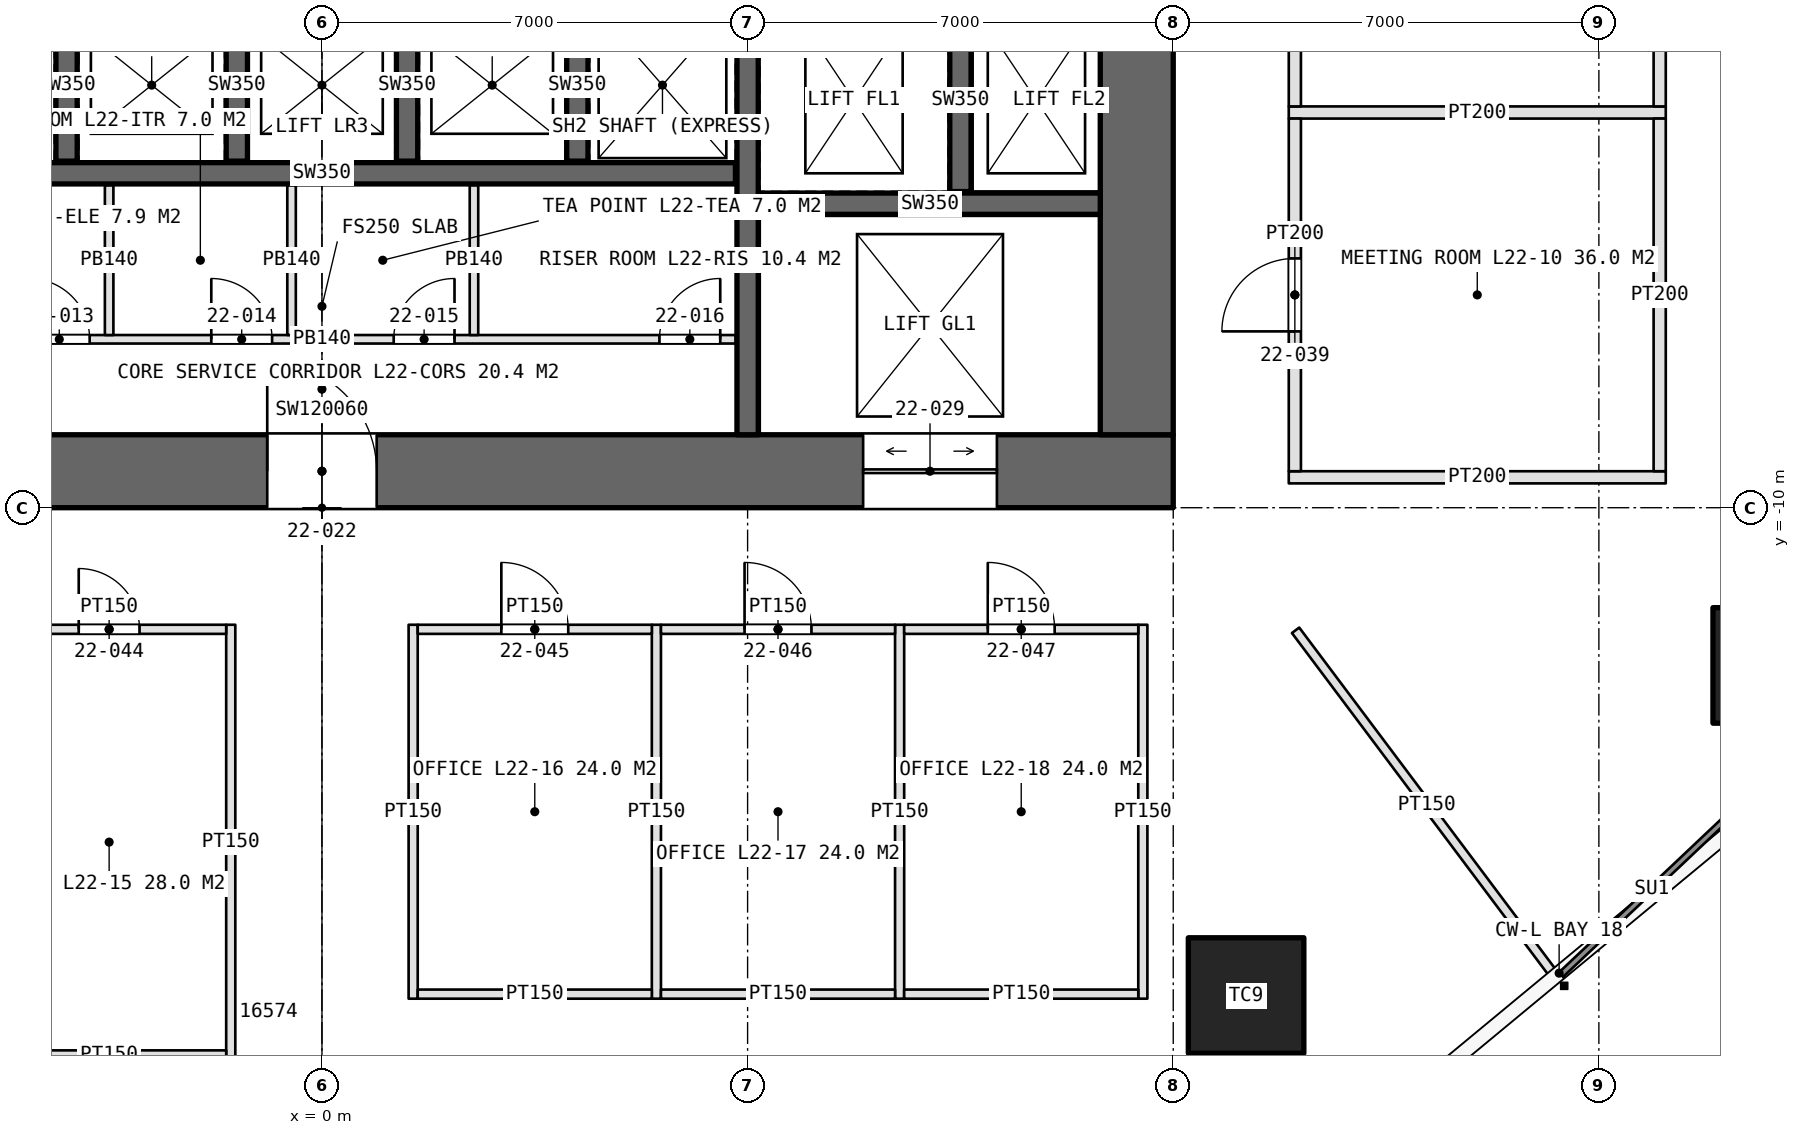
"""IFC4 building model, lengths in metres.
Left out: names, types, materials, properties, quantities, classifications, styles, units other than length and angle.
Written with IfcOpenShell. Run it as: python <this file> out.ifc"""

import sys

from ifc_helpers import new_model, si_unit, direction, frame, frame_2d, origin, origin_2d, place, context, subcontext, project, spatial, rectangle, extrude, element, fill, save


model = new_model("IFC4")
c1 = context("Model", 3, precision=1e-05, world=origin(), true_north=direction((0.0, 1.0)))
c2 = subcontext(c1, "Body", "Model", "MODEL_VIEW")
j1 = project(units=[si_unit("LENGTHUNIT", "METRE"), si_unit("PLANEANGLEUNIT", "RADIAN")], contexts=[c1])
p1 = place(None, origin())
s1 = spatial("IfcSite", under=j1, at=p1, CompositionType="ELEMENT")
p2 = place(p1, origin())
s2 = spatial("IfcBuilding", under=s1, at=p2, CompositionType="ELEMENT")
p3 = place(p2, frame((0.0, 0.0, 109.2)))
s3 = spatial("IfcBuildingStorey", under=s2, at=p3, CompositionType="ELEMENT", Elevation=109.2)
p4 = place(p3, frame((-14.0, -9.4, 0.0), z_axis=(0.0, 0.0, 1.0), x_axis=(1.0, 0.0, 0.0)))
e1 = element("IfcWall", 1, at=p4, inside=s3, PredefinedType="SHEAR", context=c2, shape_type="SweptSolid", body=[
    extrude(rectangle(XDim=28.0, YDim=1.2, at=frame_2d((14.0, 0.0))), origin(), (0.0, 0.0, 1.0), 4.2),
])
p5 = place(p4, frame((13.1, 0.0, 0.0)))
e2 = element("IfcOpeningElement", 2, at=p5, cuts=e1, PredefinedType="OPENING", context=c2, shape_type="SweptSolid", body=[
    extrude(rectangle(XDim=1.8, YDim=2.4, at=frame_2d((0.9, 1.2))), frame((0.0, 0.61, 0.0), z_axis=(0.0, -1.0, 0.0), x_axis=(1.0, 0.0, 0.0)), (0.0, 0.0, 1.0), 1.22),
])
p6 = place(p4, frame((22.9, 0.0, 0.0)))
e3 = element("IfcOpeningElement", 3, at=p6, cuts=e1, PredefinedType="OPENING", context=c2, shape_type="SweptSolid", body=[
    extrude(rectangle(XDim=2.2, YDim=2.7, at=frame_2d((1.1, 1.35))), frame((0.0, 0.61, 0.0), z_axis=(0.0, -1.0, 0.0), x_axis=(1.0, 0.0, 0.0)), (0.0, 0.0, 1.0), 1.22),
])
p7 = place(p3, frame((13.4, -8.8, 0.0), z_axis=(0.0, 0.0, 1.0), x_axis=(0.0, 1.0, 0.0)))
e4 = element("IfcWall", 4, at=p7, inside=s3, PredefinedType="SHEAR", context=c2, shape_type="SweptSolid", body=[
    extrude(rectangle(XDim=17.6, YDim=1.2, at=frame_2d((8.8, 0.0))), origin(), (0.0, 0.0, 1.0), 4.2),
])
p8 = place(p7, frame((7.9, 0.0, 0.0)))
e5 = element("IfcOpeningElement", 5, at=p8, cuts=e4, PredefinedType="OPENING", context=c2, shape_type="SweptSolid", body=[
    extrude(rectangle(XDim=1.8, YDim=2.4, at=frame_2d((0.9, 1.2))), frame((0.0, 0.61, 0.0), z_axis=(0.0, -1.0, 0.0), x_axis=(1.0, 0.0, 0.0)), (0.0, 0.0, 1.0), 1.22),
])
p9 = place(p3, frame((7.0, -8.8, 0.0), z_axis=(0.0, 0.0, 1.0), x_axis=(0.0, 1.0, 0.0)))
e6 = element("IfcWall", 6, at=p9, inside=s3, PredefinedType="SHEAR", context=c2, shape_type="SweptSolid", body=[
    extrude(rectangle(XDim=17.6, YDim=0.35, at=frame_2d((8.8, 0.0))), origin(), (0.0, 0.0, 1.0), 4.2),
])
p10 = place(p9, frame((7.9, 0.0, 0.0)))
e7 = element("IfcOpeningElement", 7, at=p10, cuts=e6, PredefinedType="OPENING", context=c2, shape_type="SweptSolid", body=[
    extrude(rectangle(XDim=1.8, YDim=2.4, at=frame_2d((0.9, 1.2))), frame((0.0, 0.185, 0.0), z_axis=(0.0, -1.0, 0.0), x_axis=(1.0, 0.0, 0.0)), (0.0, 0.0, 1.0), 0.37),
])
p11 = place(p3, frame((-6.8, -4.5, 0.0), z_axis=(0.0, 0.0, 1.0), x_axis=(1.0, 0.0, 0.0)))
e8 = element("IfcWall", 8, at=p11, inside=s3, PredefinedType="SHEAR", context=c2, shape_type="SweptSolid", body=[
    extrude(rectangle(XDim=13.6, YDim=0.35, at=frame_2d((6.8, 0.0))), origin(), (0.0, 0.0, 1.0), 4.2),
])
p12 = place(p3, frame((10.5, -4.8, 0.0), z_axis=(0.0, 0.0, 1.0), x_axis=(0.0, 1.0, 0.0)))
e9 = element("IfcWall", 9, at=p12, inside=s3, PredefinedType="SHEAR", context=c2, shape_type="SweptSolid", body=[
    extrude(rectangle(XDim=3.0, YDim=0.35, at=frame_2d((1.5, 0.0))), origin(), (0.0, 0.0, 1.0), 4.2),
])
p13 = place(p3, frame((7.2, -5.0, 0.0), z_axis=(0.0, 0.0, 1.0), x_axis=(1.0, 0.0, 0.0)))
e10 = element("IfcWall", 10, at=p13, inside=s3, PredefinedType="SHEAR", context=c2, shape_type="SweptSolid", body=[
    extrude(rectangle(XDim=5.6, YDim=0.35, at=frame_2d((2.8, 0.0))), origin(), (0.0, 0.0, 1.0), 4.2),
])
for number, where, z_axis, x_axis in (
    (11, (-4.2, -4.3, 0.0), (0.0, 0.0, 1.0), (0.0, 1.0, 0.0)),
    (12, (-1.4, -4.3, 0.0), (0.0, 0.0, 1.0), (0.0, 1.0, 0.0)),
    (13, (1.4, -4.3, 0.0), (0.0, 0.0, 1.0), (0.0, 1.0, 0.0)),
    (14, (4.2, -4.3, 0.0), (0.0, 0.0, 1.0), (0.0, 1.0, 0.0)),
):
    element("IfcWall", number, at=place(p3, frame(where, z_axis=z_axis, x_axis=x_axis)), inside=s3, PredefinedType="SHEAR", context=c2, shape_type="SweptSolid", body=[
        extrude(rectangle(XDim=2.5, YDim=0.35, at=frame_2d((1.25, 0.0))), origin(), (0.0, 0.0, 1.0), 4.2),
    ])
for number, where, z_axis, x_axis in (
    (15, (15.198, -18.023, 0.0), (0.0, 0.0, 1.0), (1.0, 0.0, 0.0)),
    (16, (23.826, -12.594, 0.0), (0.0, 0.0, 1.0), (1.0, 0.0, 0.0)),
):
    element("IfcColumn", number, at=place(p3, frame(where, z_axis=z_axis, x_axis=x_axis)), inside=s3, PredefinedType="COLUMN", context=c2, shape_type="SweptSolid", body=[
        extrude(rectangle(XDim=1.9, YDim=1.9, at=origin_2d()), origin(), (0.0, 0.0, 1.0), 4.2),
    ])
p14 = place(p3, frame((-6.8, -7.23, 0.0), z_axis=(0.0, 0.0, 1.0), x_axis=(1.0, 0.0, 0.0)))
e17 = element("IfcWall", 17, at=p14, inside=s3, PredefinedType="PARTITIONING", context=c2, shape_type="SweptSolid", body=[
    extrude(rectangle(XDim=13.6, YDim=0.14, at=frame_2d((6.8, 0.0))), origin(), (0.0, 0.0, 1.0), 3.95),
])
p15 = place(p14, frame((1.98, 0.0, 0.0)))
e18 = element("IfcOpeningElement", 18, at=p15, cuts=e17, PredefinedType="OPENING", context=c2, shape_type="SweptSolid", body=[
    extrude(rectangle(XDim=1.0, YDim=2.4, at=frame_2d((0.5, 1.2))), frame((0.0, 0.08, 0.0), z_axis=(0.0, -1.0, 0.0), x_axis=(1.0, 0.0, 0.0)), (0.0, 0.0, 1.0), 0.16),
])
p16 = place(p14, frame((4.98, 0.0, 0.0)))
e19 = element("IfcOpeningElement", 19, at=p16, cuts=e17, PredefinedType="OPENING", context=c2, shape_type="SweptSolid", body=[
    extrude(rectangle(XDim=1.0, YDim=2.4, at=frame_2d((0.5, 1.2))), frame((0.0, 0.08, 0.0), z_axis=(0.0, -1.0, 0.0), x_axis=(1.0, 0.0, 0.0)), (0.0, 0.0, 1.0), 0.16),
])
p17 = place(p14, frame((7.98, 0.0, 0.0)))
e20 = element("IfcOpeningElement", 20, at=p17, cuts=e17, PredefinedType="OPENING", context=c2, shape_type="SweptSolid", body=[
    extrude(rectangle(XDim=1.0, YDim=2.4, at=frame_2d((0.5, 1.2))), frame((0.0, 0.08, 0.0), z_axis=(0.0, -1.0, 0.0), x_axis=(1.0, 0.0, 0.0)), (0.0, 0.0, 1.0), 0.16),
])
p18 = place(p14, frame((12.35, 0.0, 0.0)))
e21 = element("IfcOpeningElement", 21, at=p18, cuts=e17, PredefinedType="OPENING", context=c2, shape_type="SweptSolid", body=[
    extrude(rectangle(XDim=1.0, YDim=2.4, at=frame_2d((0.5, 1.2))), frame((0.0, 0.08, 0.0), z_axis=(0.0, -1.0, 0.0), x_axis=(1.0, 0.0, 0.0)), (0.0, 0.0, 1.0), 0.16),
])
for number, where, z_axis, x_axis in (
    (22, (-3.5, -4.7, 0.0), (0.0, 0.0, 1.0), (0.0, -1.0, 0.0)),
    (23, (-0.5, -4.7, 0.0), (0.0, 0.0, 1.0), (0.0, -1.0, 0.0)),
    (24, (2.5, -4.7, 0.0), (0.0, 0.0, 1.0), (0.0, -1.0, 0.0)),
):
    element("IfcWall", number, at=place(p3, frame(where, z_axis=z_axis, x_axis=x_axis)), inside=s3, PredefinedType="PARTITIONING", context=c2, shape_type="SweptSolid", body=[
        extrude(rectangle(XDim=2.46, YDim=0.14, at=frame_2d((1.23, 0.0))), origin(), (0.0, 0.0, 1.0), 3.95),
    ])
for number, where, z_axis, x_axis in (
    (25, (15.9, -9.5, 0.0), (0.0, 0.0, 1.0), (1.0, 0.0, 0.0)),
    (26, (15.9, -3.5, 0.0), (0.0, 0.0, 1.0), (1.0, 0.0, 0.0)),
):
    element("IfcWall", number, at=place(p3, frame(where, z_axis=z_axis, x_axis=x_axis)), inside=s3, PredefinedType="PARTITIONING", context=c2, shape_type="SweptSolid", body=[
        extrude(rectangle(XDim=6.2, YDim=0.2, at=frame_2d((3.1, 0.0))), origin(), (0.0, 0.0, 1.0), 3.0),
    ])
p19 = place(p3, frame((16.0, -9.4, 0.0), z_axis=(0.0, 0.0, 1.0), x_axis=(0.0, 1.0, 0.0)))
e27 = element("IfcWall", 27, at=p19, inside=s3, PredefinedType="PARTITIONING", context=c2, shape_type="SweptSolid", body=[
    extrude(rectangle(XDim=5.8, YDim=0.2, at=frame_2d((2.9, 0.0))), origin(), (0.0, 0.0, 1.0), 3.0),
])
p20 = place(p19, frame((2.3, 0.0, 0.0)))
e28 = element("IfcOpeningElement", 28, at=p20, cuts=e27, PredefinedType="OPENING", context=c2, shape_type="SweptSolid", body=[
    extrude(rectangle(XDim=1.2, YDim=2.4, at=frame_2d((0.6, 1.2))), frame((0.0, 0.11, 0.0), z_axis=(0.0, -1.0, 0.0), x_axis=(1.0, 0.0, 0.0)), (0.0, 0.0, 1.0), 0.22),
])
p21 = place(p3, frame((22.0, -9.4, 0.0), z_axis=(0.0, 0.0, 1.0), x_axis=(0.0, 1.0, 0.0)))
e29 = element("IfcWall", 29, at=p21, inside=s3, PredefinedType="PARTITIONING", context=c2, shape_type="SweptSolid", body=[
    extrude(rectangle(XDim=5.8, YDim=0.2, at=frame_2d((2.9, 0.0))), origin(), (0.0, 0.0, 1.0), 3.0),
])
p22 = place(p3, frame((16.0, -3.4, 0.0), z_axis=(0.0, 0.0, 1.0), x_axis=(0.0, 1.0, 0.0)))
e30 = element("IfcWall", 30, at=p22, inside=s3, PredefinedType="PARTITIONING", context=c2, shape_type="SweptSolid", body=[
    extrude(rectangle(XDim=5.8, YDim=0.2, at=frame_2d((2.9, 0.0))), origin(), (0.0, 0.0, 1.0), 3.0),
])
p23 = place(p22, frame((2.3, 0.0, 0.0)))
e31 = element("IfcOpeningElement", 31, at=p23, cuts=e30, PredefinedType="OPENING", context=c2, shape_type="SweptSolid", body=[
    extrude(rectangle(XDim=1.2, YDim=2.4, at=frame_2d((0.6, 1.2))), frame((0.0, 0.11, 0.0), z_axis=(0.0, -1.0, 0.0), x_axis=(1.0, 0.0, 0.0)), (0.0, 0.0, 1.0), 0.22),
])
p24 = place(p3, frame((22.0, -3.4, 0.0), z_axis=(0.0, 0.0, 1.0), x_axis=(0.0, 1.0, 0.0)))
e32 = element("IfcWall", 32, at=p24, inside=s3, PredefinedType="PARTITIONING", context=c2, shape_type="SweptSolid", body=[
    extrude(rectangle(XDim=5.8, YDim=0.2, at=frame_2d((2.9, 0.0))), origin(), (0.0, 0.0, 1.0), 3.0),
])
p25 = place(p3, frame((-1.5, -11.925, 0.0), z_axis=(0.0, 0.0, 1.0), x_axis=(0.0, -1.0, 0.0)))
e33 = element("IfcWall", 33, at=p25, inside=s3, PredefinedType="PARTITIONING", context=c2, shape_type="SweptSolid", body=[
    extrude(rectangle(XDim=7.15, YDim=0.15, at=frame_2d((3.575, 0.0))), origin(), (0.0, 0.0, 1.0), 3.0),
])
p26 = place(p3, frame((-5.425, -12.0, 0.0), z_axis=(0.0, 0.0, 1.0), x_axis=(1.0, 0.0, 0.0)))
e34 = element("IfcWall", 34, at=p26, inside=s3, PredefinedType="PARTITIONING", context=c2, shape_type="SweptSolid", body=[
    extrude(rectangle(XDim=3.85, YDim=0.15, at=frame_2d((1.925, 0.0))), origin(), (0.0, 0.0, 1.0), 3.0),
])
p27 = place(p26, frame((1.425, 0.0, 0.0)))
e35 = element("IfcOpeningElement", 35, at=p27, cuts=e34, PredefinedType="OPENING", context=c2, shape_type="SweptSolid", body=[
    extrude(rectangle(XDim=1.0, YDim=2.2, at=frame_2d((0.5, 1.1))), frame((0.0, 0.085, 0.0), z_axis=(0.0, -1.0, 0.0), x_axis=(1.0, 0.0, 0.0)), (0.0, 0.0, 1.0), 0.17),
])
p28 = place(p3, frame((-5.425, -19.0, 0.0), z_axis=(0.0, 0.0, 1.0), x_axis=(1.0, 0.0, 0.0)))
e36 = element("IfcWall", 36, at=p28, inside=s3, PredefinedType="PARTITIONING", context=c2, shape_type="SweptSolid", body=[
    extrude(rectangle(XDim=3.85, YDim=0.15, at=frame_2d((1.925, 0.0))), origin(), (0.0, 0.0, 1.0), 3.0),
])
for number, where, z_axis, x_axis in (
    (37, (1.5, -11.925, 0.0), (0.0, 0.0, 1.0), (0.0, -1.0, 0.0)),
    (38, (5.5, -11.925, 0.0), (0.0, 0.0, 1.0), (0.0, -1.0, 0.0)),
    (39, (9.5, -11.925, 0.0), (0.0, 0.0, 1.0), (0.0, -1.0, 0.0)),
    (40, (13.5, -11.925, 0.0), (0.0, 0.0, 1.0), (0.0, -1.0, 0.0)),
):
    element("IfcWall", number, at=place(p3, frame(where, z_axis=z_axis, x_axis=x_axis)), inside=s3, PredefinedType="PARTITIONING", context=c2, shape_type="SweptSolid", body=[
        extrude(rectangle(XDim=6.15, YDim=0.15, at=frame_2d((3.075, 0.0))), origin(), (0.0, 0.0, 1.0), 3.0),
    ])
p29 = place(p3, frame((1.575, -12.0, 0.0), z_axis=(0.0, 0.0, 1.0), x_axis=(1.0, 0.0, 0.0)))
e41 = element("IfcWall", 41, at=p29, inside=s3, PredefinedType="PARTITIONING", context=c2, shape_type="SweptSolid", body=[
    extrude(rectangle(XDim=3.85, YDim=0.15, at=frame_2d((1.925, 0.0))), origin(), (0.0, 0.0, 1.0), 3.0),
])
p30 = place(p29, frame((1.375, 0.0, 0.0)))
e42 = element("IfcOpeningElement", 42, at=p30, cuts=e41, PredefinedType="OPENING", context=c2, shape_type="SweptSolid", body=[
    extrude(rectangle(XDim=1.1, YDim=2.3, at=frame_2d((0.55, 1.15))), frame((0.0, 0.085, 0.0), z_axis=(0.0, -1.0, 0.0), x_axis=(1.0, 0.0, 0.0)), (0.0, 0.0, 1.0), 0.17),
])
p31 = place(p3, frame((1.575, -18.0, 0.0), z_axis=(0.0, 0.0, 1.0), x_axis=(1.0, 0.0, 0.0)))
e43 = element("IfcWall", 43, at=p31, inside=s3, PredefinedType="PARTITIONING", context=c2, shape_type="SweptSolid", body=[
    extrude(rectangle(XDim=3.85, YDim=0.15, at=frame_2d((1.925, 0.0))), origin(), (0.0, 0.0, 1.0), 3.0),
])
p32 = place(p3, frame((5.575, -12.0, 0.0), z_axis=(0.0, 0.0, 1.0), x_axis=(1.0, 0.0, 0.0)))
e44 = element("IfcWall", 44, at=p32, inside=s3, PredefinedType="PARTITIONING", context=c2, shape_type="SweptSolid", body=[
    extrude(rectangle(XDim=3.85, YDim=0.15, at=frame_2d((1.925, 0.0))), origin(), (0.0, 0.0, 1.0), 3.0),
])
p33 = place(p32, frame((1.375, 0.0, 0.0)))
e45 = element("IfcOpeningElement", 45, at=p33, cuts=e44, PredefinedType="OPENING", context=c2, shape_type="SweptSolid", body=[
    extrude(rectangle(XDim=1.1, YDim=2.3, at=frame_2d((0.55, 1.15))), frame((0.0, 0.085, 0.0), z_axis=(0.0, -1.0, 0.0), x_axis=(1.0, 0.0, 0.0)), (0.0, 0.0, 1.0), 0.17),
])
p34 = place(p3, frame((5.575, -18.0, 0.0), z_axis=(0.0, 0.0, 1.0), x_axis=(1.0, 0.0, 0.0)))
e46 = element("IfcWall", 46, at=p34, inside=s3, PredefinedType="PARTITIONING", context=c2, shape_type="SweptSolid", body=[
    extrude(rectangle(XDim=3.85, YDim=0.15, at=frame_2d((1.925, 0.0))), origin(), (0.0, 0.0, 1.0), 3.0),
])
p35 = place(p3, frame((9.575, -12.0, 0.0), z_axis=(0.0, 0.0, 1.0), x_axis=(1.0, 0.0, 0.0)))
e47 = element("IfcWall", 47, at=p35, inside=s3, PredefinedType="PARTITIONING", context=c2, shape_type="SweptSolid", body=[
    extrude(rectangle(XDim=3.85, YDim=0.15, at=frame_2d((1.925, 0.0))), origin(), (0.0, 0.0, 1.0), 3.0),
])
p36 = place(p35, frame((1.375, 0.0, 0.0)))
e48 = element("IfcOpeningElement", 48, at=p36, cuts=e47, PredefinedType="OPENING", context=c2, shape_type="SweptSolid", body=[
    extrude(rectangle(XDim=1.1, YDim=2.3, at=frame_2d((0.55, 1.15))), frame((0.0, 0.085, 0.0), z_axis=(0.0, -1.0, 0.0), x_axis=(1.0, 0.0, 0.0)), (0.0, 0.0, 1.0), 0.17),
])
p37 = place(p3, frame((9.575, -18.0, 0.0), z_axis=(0.0, 0.0, 1.0), x_axis=(1.0, 0.0, 0.0)))
e49 = element("IfcWall", 49, at=p37, inside=s3, PredefinedType="PARTITIONING", context=c2, shape_type="SweptSolid", body=[
    extrude(rectangle(XDim=3.85, YDim=0.15, at=frame_2d((1.925, 0.0))), origin(), (0.0, 0.0, 1.0), 3.0),
])
p38 = place(p3, frame((16.012, -12.016, 0.0), z_axis=(0.0, 0.0, 1.0), x_axis=(0.600059749679, -0.799955184254, 0.0)))
e50 = element("IfcWall", 50, at=p38, inside=s3, PredefinedType="PARTITIONING", context=c2, shape_type="SweptSolid", body=[
    extrude(rectangle(XDim=7.191, YDim=0.15, at=frame_2d((3.596, 0.0))), origin(), (0.0, 0.0, 1.0), 3.0),
])
p39 = place(p15, origin())
e51 = element("IfcDoor", 51, at=p39, inside=s3, OperationType="SINGLE_SWING_LEFT", PredefinedType="DOOR", context=c2, shape_type="SweptSolid", body=[
    extrude(rectangle(XDim=1.0, YDim=2.4, at=frame_2d((0.5, 1.2))), frame((0.0, 0.025, 0.0), z_axis=(0.0, -1.0, 0.0), x_axis=(1.0, 0.0, 0.0)), (0.0, 0.0, 1.0), 0.05),
])
fill(e18, e51)
p40 = place(p16, origin())
e52 = element("IfcDoor", 52, at=p40, inside=s3, OperationType="SINGLE_SWING_LEFT", PredefinedType="DOOR", context=c2, shape_type="SweptSolid", body=[
    extrude(rectangle(XDim=1.0, YDim=2.4, at=frame_2d((0.5, 1.2))), frame((0.0, 0.025, 0.0), z_axis=(0.0, -1.0, 0.0), x_axis=(1.0, 0.0, 0.0)), (0.0, 0.0, 1.0), 0.05),
])
fill(e19, e52)
p41 = place(p17, origin())
e53 = element("IfcDoor", 53, at=p41, inside=s3, OperationType="SINGLE_SWING_RIGHT", PredefinedType="DOOR", context=c2, shape_type="SweptSolid", body=[
    extrude(rectangle(XDim=1.0, YDim=2.4, at=frame_2d((0.5, 1.2))), frame((0.0, 0.025, 0.0), z_axis=(0.0, -1.0, 0.0), x_axis=(1.0, 0.0, 0.0)), (0.0, 0.0, 1.0), 0.05),
])
fill(e20, e53)
p42 = place(p18, origin())
e54 = element("IfcDoor", 54, at=p42, inside=s3, OperationType="SINGLE_SWING_RIGHT", PredefinedType="DOOR", context=c2, shape_type="SweptSolid", body=[
    extrude(rectangle(XDim=1.0, YDim=2.4, at=frame_2d((0.5, 1.2))), frame((0.0, 0.025, 0.0), z_axis=(0.0, -1.0, 0.0), x_axis=(1.0, 0.0, 0.0)), (0.0, 0.0, 1.0), 0.05),
])
fill(e21, e54)
p43 = place(p5, origin())
e55 = element("IfcDoor", 55, at=p43, inside=s3, OperationType="DOUBLE_DOOR_SINGLE_SWING", PredefinedType="DOOR", context=c2, shape_type="SweptSolid", body=[
    extrude(rectangle(XDim=1.8, YDim=2.4, at=frame_2d((0.9, 1.2))), frame((0.0, 0.025, 0.0), z_axis=(0.0, -1.0, 0.0), x_axis=(1.0, 0.0, 0.0)), (0.0, 0.0, 1.0), 0.05),
])
fill(e2, e55)
p44 = place(p6, origin())
e56 = element("IfcDoor", 56, at=p44, inside=s3, OperationType="DOUBLE_DOOR_SLIDING", PredefinedType="DOOR", context=c2, shape_type="SweptSolid", body=[
    extrude(rectangle(XDim=2.2, YDim=2.7, at=frame_2d((1.1, 1.35))), frame((0.0, 0.025, 0.0), z_axis=(0.0, -1.0, 0.0), x_axis=(1.0, 0.0, 0.0)), (0.0, 0.0, 1.0), 0.05),
])
fill(e3, e56)
p45 = place(p20, origin())
e57 = element("IfcDoor", 57, at=p45, inside=s3, OperationType="SINGLE_SWING_LEFT", PredefinedType="DOOR", context=c2, shape_type="SweptSolid", body=[
    extrude(rectangle(XDim=1.2, YDim=2.4, at=frame_2d((0.6, 1.2))), frame((0.0, 0.025, 0.0), z_axis=(0.0, -1.0, 0.0), x_axis=(1.0, 0.0, 0.0)), (0.0, 0.0, 1.0), 0.05),
])
fill(e28, e57)
p46 = place(p27, origin())
e58 = element("IfcDoor", 58, at=p46, inside=s3, OperationType="SINGLE_SWING_LEFT", PredefinedType="DOOR", context=c2, shape_type="SweptSolid", body=[
    extrude(rectangle(XDim=1.0, YDim=2.2, at=frame_2d((0.5, 1.1))), frame((0.0, 0.025, 0.0), z_axis=(0.0, -1.0, 0.0), x_axis=(1.0, 0.0, 0.0)), (0.0, 0.0, 1.0), 0.05),
])
fill(e35, e58)
p47 = place(p30, origin())
e59 = element("IfcDoor", 59, at=p47, inside=s3, OperationType="SINGLE_SWING_LEFT", PredefinedType="DOOR", context=c2, shape_type="SweptSolid", body=[
    extrude(rectangle(XDim=1.1, YDim=2.3, at=frame_2d((0.55, 1.15))), frame((0.0, 0.025, 0.0), z_axis=(0.0, -1.0, 0.0), x_axis=(1.0, 0.0, 0.0)), (0.0, 0.0, 1.0), 0.05),
])
fill(e42, e59)
p48 = place(p33, origin())
e60 = element("IfcDoor", 60, at=p48, inside=s3, OperationType="SINGLE_SWING_LEFT", PredefinedType="DOOR", context=c2, shape_type="SweptSolid", body=[
    extrude(rectangle(XDim=1.1, YDim=2.3, at=frame_2d((0.55, 1.15))), frame((0.0, 0.025, 0.0), z_axis=(0.0, -1.0, 0.0), x_axis=(1.0, 0.0, 0.0)), (0.0, 0.0, 1.0), 0.05),
])
fill(e45, e60)
p49 = place(p36, origin())
e61 = element("IfcDoor", 61, at=p49, inside=s3, OperationType="SINGLE_SWING_LEFT", PredefinedType="DOOR", context=c2, shape_type="SweptSolid", body=[
    extrude(rectangle(XDim=1.1, YDim=2.3, at=frame_2d((0.55, 1.15))), frame((0.0, 0.025, 0.0), z_axis=(0.0, -1.0, 0.0), x_axis=(1.0, 0.0, 0.0)), (0.0, 0.0, 1.0), 0.05),
])
fill(e48, e61)
save(model, sys.argv[1])
